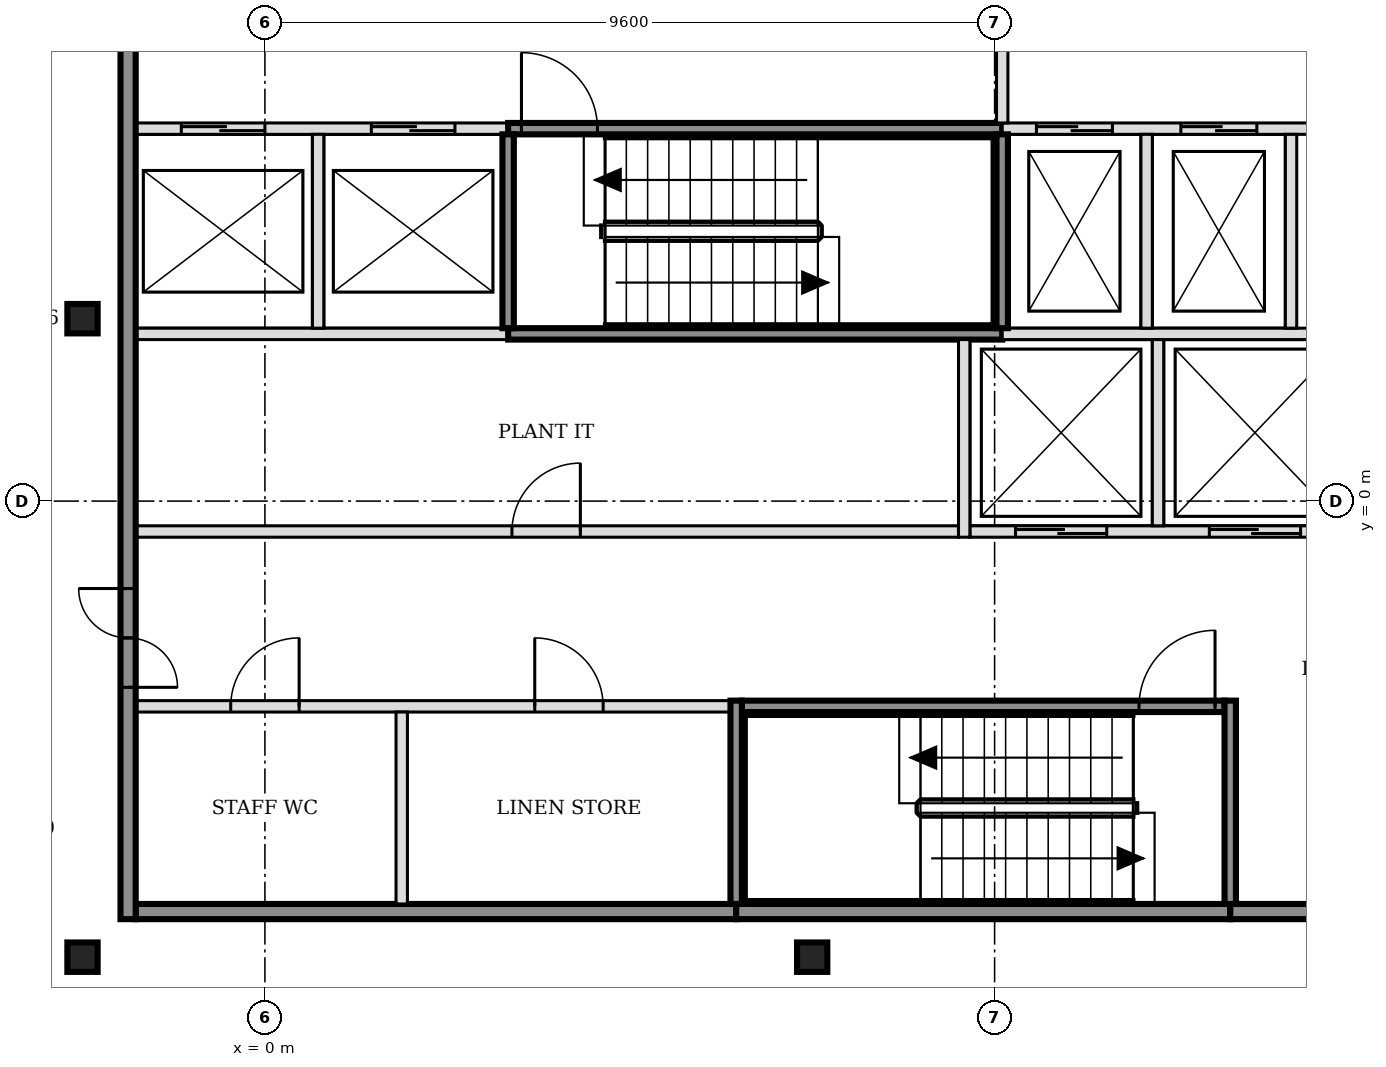
"""IFC4 building model, lengths in metres.
Left out: names, types, materials, properties, quantities, classifications, styles, units other than length and angle.
Written with IfcOpenShell. Run it as: python <this file> out.ifc"""

import sys

from ifc_helpers import new_model, si_unit, direction, frame, frame_2d, origin, origin_2d, place, context, subcontext, project, spatial, rectangle, i_section, extrude, element, fill, save


model = new_model("IFC4")
c1 = context("Model", 3, precision=1e-05, world=origin(), true_north=direction((0.0, 1.0)))
c2 = subcontext(c1, "Body", "Model", "MODEL_VIEW")
j1 = project(units=[si_unit("LENGTHUNIT", "METRE"), si_unit("PLANEANGLEUNIT", "RADIAN")], contexts=[c1])
p1 = place(None, origin())
s1 = spatial("IfcSite", under=j1, at=p1, CompositionType="ELEMENT")
p2 = place(p1, origin())
s2 = spatial("IfcBuilding", under=s1, at=p2, CompositionType="ELEMENT")
p3 = place(p2, frame((0.0, 0.0, 292.2)))
s3 = spatial("IfcBuildingStorey", under=s2, at=p3, CompositionType="ELEMENT", Elevation=292.2)
for number, where, z_axis, x_axis in (
    (1, (-2.4, -6.0, -0.15), (0.0, 0.0, 1.0), (1.0, 0.0, 0.0)),
    (2, (7.2, -6.0, -0.15), (0.0, 0.0, 1.0), (1.0, 0.0, 0.0)),
    (3, (-2.4, 2.4, -0.15), (0.0, 0.0, 1.0), (1.0, 0.0, 0.0)),
):
    element("IfcColumn", number, at=place(p3, frame(where, z_axis=z_axis, x_axis=x_axis)), inside=s3, PredefinedType="COLUMN", context=c2, shape_type="SweptSolid", body=[
        extrude(i_section(OverallWidth=0.398, OverallDepth=0.387, WebThickness=0.021, FlangeThickness=0.033, FilletRadius=0.015, at=origin_2d()), origin(), (0.0, 0.0, 1.0), 3.55),
    ])
p4 = place(p3, frame((-1.7, -5.4, 0.0), z_axis=(0.0, 0.0, 1.0), x_axis=(1.0, 0.0, 0.0)))
e4 = element("IfcWall", 4, at=p4, inside=s3, PredefinedType="SOLIDWALL", context=c2, shape_type="SweptSolid", body=[
    extrude(rectangle(XDim=7.9, YDim=0.2, at=frame_2d((3.95, 0.0))), origin(), (0.0, 0.0, 1.0), 3.4),
])
p5 = place(p3, frame((6.2, -5.4, 0.0), z_axis=(0.0, 0.0, 1.0), x_axis=(1.0, 0.0, 0.0)))
e5 = element("IfcWall", 5, at=p5, inside=s3, PredefinedType="SOLIDWALL", context=c2, shape_type="SweptSolid", body=[
    extrude(rectangle(XDim=6.5, YDim=0.2, at=frame_2d((3.25, 0.0))), origin(), (0.0, 0.0, 1.0), 3.4),
])
p6 = place(p3, frame((12.7, -5.4, 0.0), z_axis=(0.0, 0.0, 1.0), x_axis=(1.0, 0.0, 0.0)))
e6 = element("IfcWall", 6, at=p6, inside=s3, PredefinedType="SOLIDWALL", context=c2, shape_type="SweptSolid", body=[
    extrude(rectangle(XDim=3.4, YDim=0.2, at=frame_2d((1.7, 0.0))), origin(), (0.0, 0.0, 1.0), 3.4),
])
p7 = place(p3, frame((-1.7, -2.7, 0.0), z_axis=(0.0, 0.0, 1.0), x_axis=(1.0, 0.0, 0.0)))
e7 = element("IfcWall", 7, at=p7, inside=s3, PredefinedType="PARTITIONING", context=c2, shape_type="SweptSolid", body=[
    extrude(rectangle(XDim=7.825, YDim=0.15, at=frame_2d((3.913, 0.0))), origin(), (0.0, 0.0, 1.0), 3.4),
])
p8 = place(p7, frame((1.25, 0.0, 0.0)))
e8 = element("IfcOpeningElement", 8, at=p8, cuts=e7, PredefinedType="OPENING", context=c2, shape_type="SweptSolid", body=[
    extrude(rectangle(XDim=0.9, YDim=2.1, at=frame_2d((0.45, 1.05))), frame((0.0, 0.085, 0.0), z_axis=(0.0, -1.0, 0.0), x_axis=(1.0, 0.0, 0.0)), (0.0, 0.0, 1.0), 0.17),
])
p9 = place(p7, frame((5.25, 0.0, 0.0)))
e9 = element("IfcOpeningElement", 9, at=p9, cuts=e7, PredefinedType="OPENING", context=c2, shape_type="SweptSolid", body=[
    extrude(rectangle(XDim=0.9, YDim=2.1, at=frame_2d((0.45, 1.05))), frame((0.0, 0.085, 0.0), z_axis=(0.0, -1.0, 0.0), x_axis=(1.0, 0.0, 0.0)), (0.0, 0.0, 1.0), 0.17),
])
p10 = place(p3, frame((6.275, -2.7, 0.0), z_axis=(0.0, 0.0, 1.0), x_axis=(1.0, 0.0, 0.0)))
e10 = element("IfcWall", 10, at=p10, inside=s3, PredefinedType="SOLIDWALL", context=c2, shape_type="SweptSolid", body=[
    extrude(rectangle(XDim=6.35, YDim=0.15, at=frame_2d((3.175, 0.0))), origin(), (0.0, 0.0, 1.0), 3.4),
])
p11 = place(p10, frame((5.225, 0.0, 0.0)))
e11 = element("IfcOpeningElement", 11, at=p11, cuts=e10, PredefinedType="OPENING", context=c2, shape_type="SweptSolid", body=[
    extrude(rectangle(XDim=1.0, YDim=2.1, at=frame_2d((0.5, 1.05))), frame((0.0, 0.085, 0.0), z_axis=(0.0, -1.0, 0.0), x_axis=(1.0, 0.0, 0.0)), (0.0, 0.0, 1.0), 0.17),
])
p12 = place(p3, frame((-1.7, -0.4, 0.0), z_axis=(0.0, 0.0, 1.0), x_axis=(1.0, 0.0, 0.0)))
e12 = element("IfcWall", 12, at=p12, inside=s3, PredefinedType="PARTITIONING", context=c2, shape_type="SweptSolid", body=[
    extrude(rectangle(XDim=10.825, YDim=0.15, at=frame_2d((5.413, 0.0))), origin(), (0.0, 0.0, 1.0), 3.4),
])
p13 = place(p12, frame((4.95, 0.0, 0.0)))
e13 = element("IfcOpeningElement", 13, at=p13, cuts=e12, PredefinedType="OPENING", context=c2, shape_type="SweptSolid", body=[
    extrude(rectangle(XDim=0.9, YDim=2.1, at=frame_2d((0.45, 1.05))), frame((0.0, 0.085, 0.0), z_axis=(0.0, -1.0, 0.0), x_axis=(1.0, 0.0, 0.0)), (0.0, 0.0, 1.0), 0.17),
])
p14 = place(p3, frame((9.275, -0.4, 0.0), z_axis=(0.0, 0.0, 1.0), x_axis=(1.0, 0.0, 0.0)))
e14 = element("IfcWall", 14, at=p14, inside=s3, PredefinedType="SOLIDWALL", context=c2, shape_type="SweptSolid", body=[
    extrude(rectangle(XDim=4.95, YDim=0.15, at=frame_2d((2.475, 0.0))), origin(), (0.0, 0.0, 1.0), 3.4),
])
p15 = place(p14, frame((0.6, 0.0, 0.0)))
e15 = element("IfcOpeningElement", 15, at=p15, cuts=e14, PredefinedType="OPENING", context=c2, shape_type="SweptSolid", body=[
    extrude(rectangle(XDim=1.2, YDim=2.1, at=frame_2d((0.6, 1.05))), frame((0.0, 0.085, 0.0), z_axis=(0.0, -1.0, 0.0), x_axis=(1.0, 0.0, 0.0)), (0.0, 0.0, 1.0), 0.17),
])
p16 = place(p14, frame((3.15, 0.0, 0.0)))
e16 = element("IfcOpeningElement", 16, at=p16, cuts=e14, PredefinedType="OPENING", context=c2, shape_type="SweptSolid", body=[
    extrude(rectangle(XDim=1.2, YDim=2.1, at=frame_2d((0.6, 1.05))), frame((0.0, 0.085, 0.0), z_axis=(0.0, -1.0, 0.0), x_axis=(1.0, 0.0, 0.0)), (0.0, 0.0, 1.0), 0.17),
])
p17 = place(p3, frame((-1.7, 2.2, 0.0), z_axis=(0.0, 0.0, 1.0), x_axis=(1.0, 0.0, 0.0)))
e17 = element("IfcWall", 17, at=p17, inside=s3, PredefinedType="SOLIDWALL", context=c2, shape_type="SweptSolid", body=[
    extrude(rectangle(XDim=4.9, YDim=0.15, at=frame_2d((2.45, 0.0))), origin(), (0.0, 0.0, 1.0), 3.4),
])
p18 = place(p3, frame((3.2, 2.2, 0.0), z_axis=(0.0, 0.0, 1.0), x_axis=(1.0, 0.0, 0.0)))
e18 = element("IfcWall", 18, at=p18, inside=s3, PredefinedType="SOLIDWALL", context=c2, shape_type="SweptSolid", body=[
    extrude(rectangle(XDim=6.5, YDim=0.15, at=frame_2d((3.25, 0.0))), origin(), (0.0, 0.0, 1.0), 3.4),
])
p19 = place(p3, frame((9.7, 2.2, 0.0), z_axis=(0.0, 0.0, 1.0), x_axis=(1.0, 0.0, 0.0)))
e19 = element("IfcWall", 19, at=p19, inside=s3, PredefinedType="SOLIDWALL", context=c2, shape_type="SweptSolid", body=[
    extrude(rectangle(XDim=4.525, YDim=0.15, at=frame_2d((2.263, 0.0))), origin(), (0.0, 0.0, 1.0), 3.4),
])
p20 = place(p3, frame((-1.7, 4.9, 0.0), z_axis=(0.0, 0.0, 1.0), x_axis=(1.0, 0.0, 0.0)))
e20 = element("IfcWall", 20, at=p20, inside=s3, PredefinedType="SOLIDWALL", context=c2, shape_type="SweptSolid", body=[
    extrude(rectangle(XDim=4.9, YDim=0.15, at=frame_2d((2.45, 0.0))), origin(), (0.0, 0.0, 1.0), 3.4),
])
p21 = place(p20, frame((0.6, 0.0, 0.0)))
e21 = element("IfcOpeningElement", 21, at=p21, cuts=e20, PredefinedType="OPENING", context=c2, shape_type="SweptSolid", body=[
    extrude(rectangle(XDim=1.1, YDim=2.1, at=frame_2d((0.55, 1.05))), frame((0.0, 0.085, 0.0), z_axis=(0.0, -1.0, 0.0), x_axis=(1.0, 0.0, 0.0)), (0.0, 0.0, 1.0), 0.17),
])
p22 = place(p20, frame((3.1, 0.0, 0.0)))
e22 = element("IfcOpeningElement", 22, at=p22, cuts=e20, PredefinedType="OPENING", context=c2, shape_type="SweptSolid", body=[
    extrude(rectangle(XDim=1.1, YDim=2.1, at=frame_2d((0.55, 1.05))), frame((0.0, 0.085, 0.0), z_axis=(0.0, -1.0, 0.0), x_axis=(1.0, 0.0, 0.0)), (0.0, 0.0, 1.0), 0.17),
])
p23 = place(p3, frame((3.2, 4.9, 0.0), z_axis=(0.0, 0.0, 1.0), x_axis=(1.0, 0.0, 0.0)))
e23 = element("IfcWall", 23, at=p23, inside=s3, PredefinedType="SOLIDWALL", context=c2, shape_type="SweptSolid", body=[
    extrude(rectangle(XDim=6.5, YDim=0.15, at=frame_2d((3.25, 0.0))), origin(), (0.0, 0.0, 1.0), 3.4),
])
p24 = place(p23, frame((0.175, 0.0, 0.0)))
e24 = element("IfcOpeningElement", 24, at=p24, cuts=e23, PredefinedType="OPENING", context=c2, shape_type="SweptSolid", body=[
    extrude(rectangle(XDim=1.0, YDim=2.1, at=frame_2d((0.5, 1.05))), frame((0.0, 0.085, 0.0), z_axis=(0.0, -1.0, 0.0), x_axis=(1.0, 0.0, 0.0)), (0.0, 0.0, 1.0), 0.17),
])
p25 = place(p3, frame((9.7, 4.9, 0.0), z_axis=(0.0, 0.0, 1.0), x_axis=(1.0, 0.0, 0.0)))
e25 = element("IfcWall", 25, at=p25, inside=s3, PredefinedType="SOLIDWALL", context=c2, shape_type="SweptSolid", body=[
    extrude(rectangle(XDim=6.4, YDim=0.15, at=frame_2d((3.2, 0.0))), origin(), (0.0, 0.0, 1.0), 3.4),
])
p26 = place(p25, frame((0.45, 0.0, 0.0)))
e26 = element("IfcOpeningElement", 26, at=p26, cuts=e25, PredefinedType="OPENING", context=c2, shape_type="SweptSolid", body=[
    extrude(rectangle(XDim=1.0, YDim=2.1, at=frame_2d((0.5, 1.05))), frame((0.0, 0.085, 0.0), z_axis=(0.0, -1.0, 0.0), x_axis=(1.0, 0.0, 0.0)), (0.0, 0.0, 1.0), 0.17),
])
p27 = place(p25, frame((2.35, 0.0, 0.0)))
e27 = element("IfcOpeningElement", 27, at=p27, cuts=e25, PredefinedType="OPENING", context=c2, shape_type="SweptSolid", body=[
    extrude(rectangle(XDim=1.0, YDim=2.1, at=frame_2d((0.5, 1.05))), frame((0.0, 0.085, 0.0), z_axis=(0.0, -1.0, 0.0), x_axis=(1.0, 0.0, 0.0)), (0.0, 0.0, 1.0), 0.17),
])
p28 = place(p25, frame((4.7, 0.0, 0.0)))
e28 = element("IfcOpeningElement", 28, at=p28, cuts=e25, PredefinedType="OPENING", context=c2, shape_type="SweptSolid", body=[
    extrude(rectangle(XDim=0.9, YDim=2.1, at=frame_2d((0.45, 1.05))), frame((0.0, 0.085, 0.0), z_axis=(0.0, -1.0, 0.0), x_axis=(1.0, 0.0, 0.0)), (0.0, 0.0, 1.0), 0.17),
])
p29 = place(p3, frame((-1.8, -5.5, 0.0), z_axis=(0.0, 0.0, 1.0), x_axis=(0.0, 1.0, 0.0)))
e29 = element("IfcWall", 29, at=p29, inside=s3, PredefinedType="SOLIDWALL", context=c2, shape_type="SweptSolid", body=[
    extrude(rectangle(XDim=15.8, YDim=0.2, at=frame_2d((7.9, 0.0))), origin(), (0.0, 0.0, 1.0), 3.4),
])
p30 = place(p29, frame((3.05, 0.0, 0.0)))
e30 = element("IfcOpeningElement", 30, at=p30, cuts=e29, PredefinedType="OPENING", context=c2, shape_type="SweptSolid", body=[
    extrude(rectangle(XDim=1.3, YDim=2.1, at=frame_2d((0.65, 1.05))), frame((0.0, 0.11, 0.0), z_axis=(0.0, -1.0, 0.0), x_axis=(1.0, 0.0, 0.0)), (0.0, 0.0, 1.0), 0.22),
])
p31 = place(p29, frame((11.45, 0.0, 0.0)))
e31 = element("IfcOpeningElement", 31, at=p31, cuts=e29, PredefinedType="OPENING", context=c2, shape_type="SweptSolid", body=[
    extrude(rectangle(XDim=1.3, YDim=2.1, at=frame_2d((0.65, 1.05))), frame((0.0, 0.11, 0.0), z_axis=(0.0, -1.0, 0.0), x_axis=(1.0, 0.0, 0.0)), (0.0, 0.0, 1.0), 0.22),
])
p32 = place(p3, frame((0.7, 2.275, 0.0), z_axis=(0.0, 0.0, 1.0), x_axis=(0.0, 1.0, 0.0)))
e32 = element("IfcWall", 32, at=p32, inside=s3, PredefinedType="SOLIDWALL", context=c2, shape_type="SweptSolid", body=[
    extrude(rectangle(XDim=2.55, YDim=0.15, at=frame_2d((1.275, 0.0))), origin(), (0.0, 0.0, 1.0), 3.4),
])
p33 = place(p3, frame((1.8, -5.3, 0.0), z_axis=(0.0, 0.0, 1.0), x_axis=(0.0, 1.0, 0.0)))
e33 = element("IfcWall", 33, at=p33, inside=s3, PredefinedType="PARTITIONING", context=c2, shape_type="SweptSolid", body=[
    extrude(rectangle(XDim=2.525, YDim=0.15, at=frame_2d((1.263, 0.0))), origin(), (0.0, 0.0, 1.0), 3.4),
])
p34 = place(p3, frame((3.2, 2.275, 0.0), z_axis=(0.0, 0.0, 1.0), x_axis=(0.0, 1.0, 0.0)))
e34 = element("IfcWall", 34, at=p34, inside=s3, PredefinedType="SOLIDWALL", context=c2, shape_type="SweptSolid", body=[
    extrude(rectangle(XDim=2.55, YDim=0.15, at=frame_2d((1.275, 0.0))), origin(), (0.0, 0.0, 1.0), 3.4),
])
p35 = place(p3, frame((6.2, -5.3, 0.0), z_axis=(0.0, 0.0, 1.0), x_axis=(0.0, 1.0, 0.0)))
e35 = element("IfcWall", 35, at=p35, inside=s3, PredefinedType="SOLIDWALL", context=c2, shape_type="SweptSolid", body=[
    extrude(rectangle(XDim=2.675, YDim=0.15, at=frame_2d((1.337, 0.0))), origin(), (0.0, 0.0, 1.0), 3.4),
])
p36 = place(p3, frame((9.2, -0.475, 0.0), z_axis=(0.0, 0.0, 1.0), x_axis=(0.0, 1.0, 0.0)))
e36 = element("IfcWall", 36, at=p36, inside=s3, PredefinedType="SOLIDWALL", context=c2, shape_type="SweptSolid", body=[
    extrude(rectangle(XDim=2.6, YDim=0.15, at=frame_2d((1.3, 0.0))), origin(), (0.0, 0.0, 1.0), 3.4),
])
p37 = place(p3, frame((9.7, 2.275, 0.0), z_axis=(0.0, 0.0, 1.0), x_axis=(0.0, 1.0, 0.0)))
e37 = element("IfcWall", 37, at=p37, inside=s3, PredefinedType="SOLIDWALL", context=c2, shape_type="SweptSolid", body=[
    extrude(rectangle(XDim=2.55, YDim=0.15, at=frame_2d((1.275, 0.0))), origin(), (0.0, 0.0, 1.0), 3.4),
])
p38 = place(p3, frame((9.7, 4.975, 0.0), z_axis=(0.0, 0.0, 1.0), x_axis=(0.0, 1.0, 0.0)))
e38 = element("IfcWall", 38, at=p38, inside=s3, PredefinedType="SOLIDWALL", context=c2, shape_type="SweptSolid", body=[
    extrude(rectangle(XDim=2.45, YDim=0.15, at=frame_2d((1.225, 0.0))), origin(), (0.0, 0.0, 1.0), 3.4),
])
p39 = place(p3, frame((11.6, 2.275, 0.0), z_axis=(0.0, 0.0, 1.0), x_axis=(0.0, 1.0, 0.0)))
e39 = element("IfcWall", 39, at=p39, inside=s3, PredefinedType="SOLIDWALL", context=c2, shape_type="SweptSolid", body=[
    extrude(rectangle(XDim=2.55, YDim=0.15, at=frame_2d((1.275, 0.0))), origin(), (0.0, 0.0, 1.0), 3.4),
])
p40 = place(p3, frame((11.75, -0.325, 0.0), z_axis=(0.0, 0.0, 1.0), x_axis=(0.0, 1.0, 0.0)))
e40 = element("IfcWall", 40, at=p40, inside=s3, PredefinedType="SOLIDWALL", context=c2, shape_type="SweptSolid", body=[
    extrude(rectangle(XDim=2.45, YDim=0.15, at=frame_2d((1.225, 0.0))), origin(), (0.0, 0.0, 1.0), 3.4),
])
p41 = place(p3, frame((12.7, -5.3, 0.0), z_axis=(0.0, 0.0, 1.0), x_axis=(0.0, 1.0, 0.0)))
e41 = element("IfcWall", 41, at=p41, inside=s3, PredefinedType="SOLIDWALL", context=c2, shape_type="SweptSolid", body=[
    extrude(rectangle(XDim=2.675, YDim=0.15, at=frame_2d((1.337, 0.0))), origin(), (0.0, 0.0, 1.0), 3.4),
])
p42 = place(p3, frame((13.5, 2.275, 0.0), z_axis=(0.0, 0.0, 1.0), x_axis=(0.0, 1.0, 0.0)))
e42 = element("IfcWall", 42, at=p42, inside=s3, PredefinedType="SOLIDWALL", context=c2, shape_type="SweptSolid", body=[
    extrude(rectangle(XDim=2.55, YDim=0.15, at=frame_2d((1.275, 0.0))), origin(), (0.0, 0.0, 1.0), 3.4),
])
p43 = place(p15, origin())
e43 = element("IfcDoor", 43, at=p43, inside=s3, OperationType="DOUBLE_DOOR_SLIDING", PredefinedType="DOOR", context=c2, shape_type="SweptSolid", body=[
    extrude(rectangle(XDim=1.2, YDim=2.1, at=frame_2d((0.6, 1.05))), frame((0.0, 0.025, 0.0), z_axis=(0.0, -1.0, 0.0), x_axis=(1.0, 0.0, 0.0)), (0.0, 0.0, 1.0), 0.05),
])
fill(e15, e43)
p44 = place(p16, origin())
e44 = element("IfcDoor", 44, at=p44, inside=s3, OperationType="DOUBLE_DOOR_SLIDING", PredefinedType="DOOR", context=c2, shape_type="SweptSolid", body=[
    extrude(rectangle(XDim=1.2, YDim=2.1, at=frame_2d((0.6, 1.05))), frame((0.0, 0.025, 0.0), z_axis=(0.0, -1.0, 0.0), x_axis=(1.0, 0.0, 0.0)), (0.0, 0.0, 1.0), 0.05),
])
fill(e16, e44)
p45 = place(p21, origin())
e45 = element("IfcDoor", 45, at=p45, inside=s3, OperationType="DOUBLE_DOOR_SLIDING", PredefinedType="DOOR", context=c2, shape_type="SweptSolid", body=[
    extrude(rectangle(XDim=1.1, YDim=2.1, at=frame_2d((0.55, 1.05))), frame((0.0, 0.025, 0.0), z_axis=(0.0, -1.0, 0.0), x_axis=(1.0, 0.0, 0.0)), (0.0, 0.0, 1.0), 0.05),
])
fill(e21, e45)
p46 = place(p22, origin())
e46 = element("IfcDoor", 46, at=p46, inside=s3, OperationType="DOUBLE_DOOR_SLIDING", PredefinedType="DOOR", context=c2, shape_type="SweptSolid", body=[
    extrude(rectangle(XDim=1.1, YDim=2.1, at=frame_2d((0.55, 1.05))), frame((0.0, 0.025, 0.0), z_axis=(0.0, -1.0, 0.0), x_axis=(1.0, 0.0, 0.0)), (0.0, 0.0, 1.0), 0.05),
])
fill(e22, e46)
p47 = place(p26, origin())
e47 = element("IfcDoor", 47, at=p47, inside=s3, OperationType="DOUBLE_DOOR_SLIDING", PredefinedType="DOOR", context=c2, shape_type="SweptSolid", body=[
    extrude(rectangle(XDim=1.0, YDim=2.1, at=frame_2d((0.5, 1.05))), frame((0.0, 0.025, 0.0), z_axis=(0.0, -1.0, 0.0), x_axis=(1.0, 0.0, 0.0)), (0.0, 0.0, 1.0), 0.05),
])
fill(e26, e47)
p48 = place(p27, origin())
e48 = element("IfcDoor", 48, at=p48, inside=s3, OperationType="DOUBLE_DOOR_SLIDING", PredefinedType="DOOR", context=c2, shape_type="SweptSolid", body=[
    extrude(rectangle(XDim=1.0, YDim=2.1, at=frame_2d((0.5, 1.05))), frame((0.0, 0.025, 0.0), z_axis=(0.0, -1.0, 0.0), x_axis=(1.0, 0.0, 0.0)), (0.0, 0.0, 1.0), 0.05),
])
fill(e27, e48)
p49 = place(p11, origin())
e49 = element("IfcDoor", 49, at=p49, inside=s3, OperationType="SINGLE_SWING_RIGHT", PredefinedType="DOOR", context=c2, shape_type="SweptSolid", body=[
    extrude(rectangle(XDim=1.0, YDim=2.1, at=frame_2d((0.5, 1.05))), frame((0.0, 0.025, 0.0), z_axis=(0.0, -1.0, 0.0), x_axis=(1.0, 0.0, 0.0)), (0.0, 0.0, 1.0), 0.05),
])
fill(e11, e49)
p50 = place(p24, origin())
e50 = element("IfcDoor", 50, at=p50, inside=s3, OperationType="SINGLE_SWING_LEFT", PredefinedType="DOOR", context=c2, shape_type="SweptSolid", body=[
    extrude(rectangle(XDim=1.0, YDim=2.1, at=frame_2d((0.5, 1.05))), frame((0.0, 0.025, 0.0), z_axis=(0.0, -1.0, 0.0), x_axis=(1.0, 0.0, 0.0)), (0.0, 0.0, 1.0), 0.05),
])
fill(e24, e50)
p51 = place(p30, origin())
e51 = element("IfcDoor", 51, at=p51, inside=s3, OperationType="DOUBLE_DOOR_SINGLE_SWING", PredefinedType="DOOR", context=c2, shape_type="SweptSolid", body=[
    extrude(rectangle(XDim=1.3, YDim=2.1, at=frame_2d((0.65, 1.05))), frame((0.0, 0.025, 0.0), z_axis=(0.0, -1.0, 0.0), x_axis=(1.0, 0.0, 0.0)), (0.0, 0.0, 1.0), 0.05),
])
fill(e30, e51)
p52 = place(p8, origin())
e52 = element("IfcDoor", 52, at=p52, inside=s3, OperationType="SINGLE_SWING_RIGHT", PredefinedType="DOOR", context=c2, shape_type="SweptSolid", body=[
    extrude(rectangle(XDim=0.9, YDim=2.1, at=frame_2d((0.45, 1.05))), frame((0.0, 0.025, 0.0), z_axis=(0.0, -1.0, 0.0), x_axis=(1.0, 0.0, 0.0)), (0.0, 0.0, 1.0), 0.05),
])
fill(e8, e52)
p53 = place(p9, origin())
e53 = element("IfcDoor", 53, at=p53, inside=s3, OperationType="SINGLE_SWING_LEFT", PredefinedType="DOOR", context=c2, shape_type="SweptSolid", body=[
    extrude(rectangle(XDim=0.9, YDim=2.1, at=frame_2d((0.45, 1.05))), frame((0.0, 0.025, 0.0), z_axis=(0.0, -1.0, 0.0), x_axis=(1.0, 0.0, 0.0)), (0.0, 0.0, 1.0), 0.05),
])
fill(e9, e53)
p54 = place(p13, origin())
e54 = element("IfcDoor", 54, at=p54, inside=s3, OperationType="SINGLE_SWING_RIGHT", PredefinedType="DOOR", context=c2, shape_type="SweptSolid", body=[
    extrude(rectangle(XDim=0.9, YDim=2.1, at=frame_2d((0.45, 1.05))), frame((0.0, 0.025, 0.0), z_axis=(0.0, -1.0, 0.0), x_axis=(1.0, 0.0, 0.0)), (0.0, 0.0, 1.0), 0.05),
])
fill(e13, e54)
save(model, sys.argv[1])
